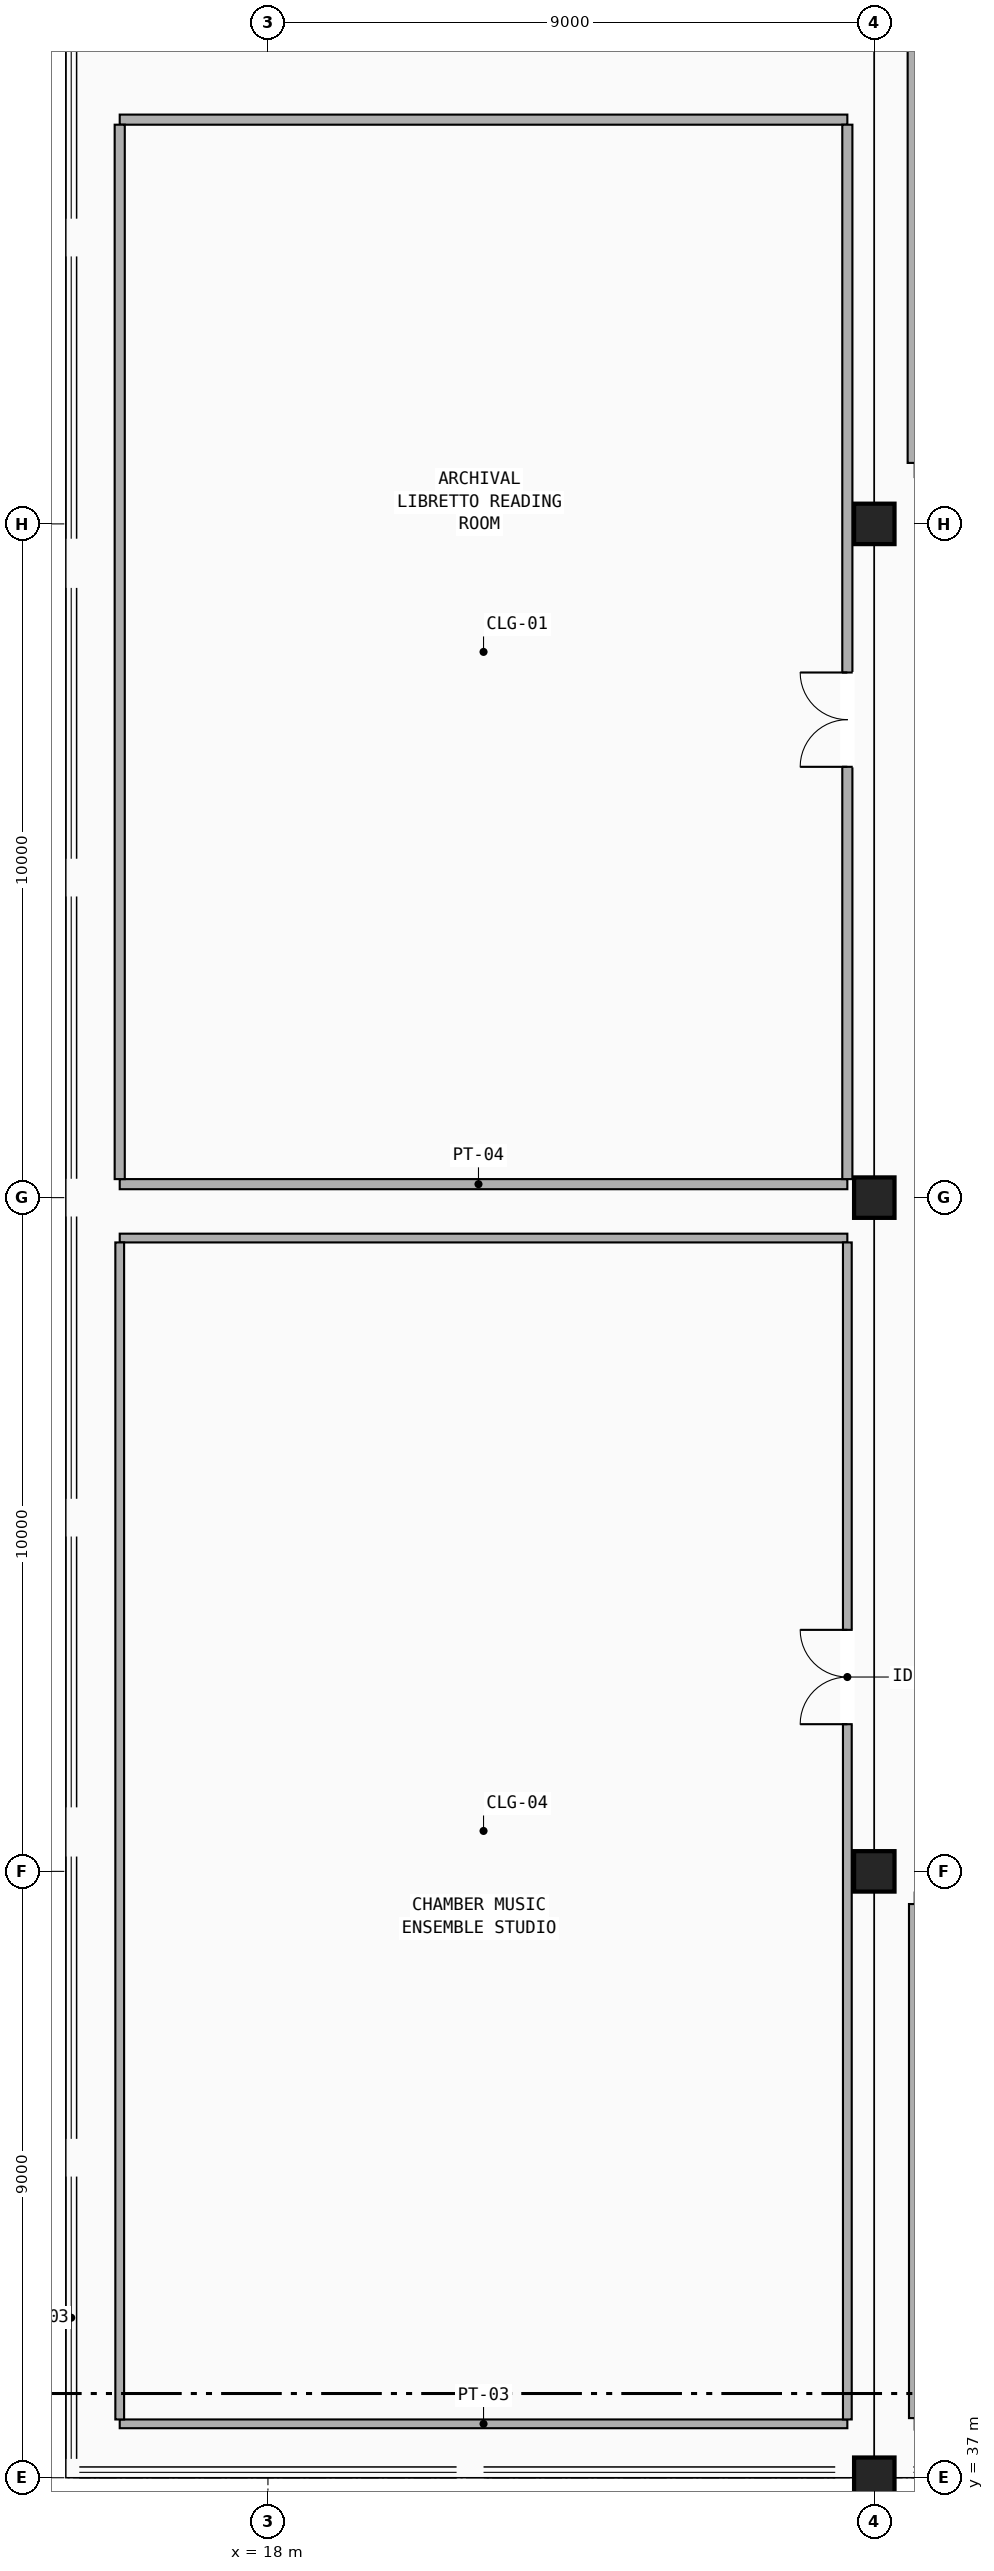
"""IFC4 building model, lengths in metres.
Left out: names, types, materials, properties, quantities, classifications, styles, units other than length and angle.
Written with IfcOpenShell. Run it as: python <this file> out.ifc"""

import sys

from ifc_helpers import new_model, si_unit, direction, frame, frame_2d, origin, origin_2d, place, context, subcontext, project, spatial, rectangle, extrude, element, fill, save


model = new_model("IFC4")
c1 = context("Model", 3, precision=1e-05, world=origin(), true_north=direction((0.0, 1.0)))
c2 = subcontext(c1, "Body", "Model", "MODEL_VIEW")
j1 = project(units=[si_unit("LENGTHUNIT", "METRE"), si_unit("PLANEANGLEUNIT", "RADIAN")], contexts=[c1])
p1 = place(None, origin())
s1 = spatial("IfcSite", under=j1, at=p1, CompositionType="ELEMENT")
p2 = place(p1, origin())
s2 = spatial("IfcBuilding", under=s1, at=p2, CompositionType="ELEMENT")
p3 = place(p2, frame((0.0, 0.0, 21.76)))
s3 = spatial("IfcBuildingStorey", under=s2, at=p3, CompositionType="ELEMENT", Elevation=21.76)
p4 = place(p3, frame((27.0, 37.0, 0.0), z_axis=(0.0, 0.0, 1.0), x_axis=(1.0, 0.0, 0.0)))
e1 = element("IfcColumn", 1, at=p4, inside=s3, PredefinedType="COLUMN", context=c2, shape_type="SweptSolid", body=[
    extrude(rectangle(XDim=0.6, YDim=0.6, at=origin_2d()), origin(), (0.0, 0.0, 1.0), 9.0),
])
p5 = place(p3, frame((27.0, 46.0, 0.0), z_axis=(0.0, 0.0, 1.0), x_axis=(1.0, 0.0, 0.0)))
e2 = element("IfcColumn", 2, at=p5, inside=s3, PredefinedType="COLUMN", context=c2, shape_type="SweptSolid", body=[
    extrude(rectangle(XDim=0.6, YDim=0.6, at=origin_2d()), origin(), (0.0, 0.0, 1.0), 7.987),
])
p6 = place(p3, frame((27.0, 56.0, 0.0), z_axis=(0.0, 0.0, 1.0), x_axis=(1.0, 0.0, 0.0)))
e3 = element("IfcColumn", 3, at=p6, inside=s3, PredefinedType="COLUMN", context=c2, shape_type="SweptSolid", body=[
    extrude(rectangle(XDim=0.6, YDim=0.6, at=origin_2d()), origin(), (0.0, 0.0, 1.0), 3.25),
])
p7 = place(p3, frame((27.0, 66.0, 0.0), z_axis=(0.0, 0.0, 1.0), x_axis=(1.0, 0.0, 0.0)))
e4 = element("IfcColumn", 4, at=p7, inside=s3, PredefinedType="COLUMN", context=c2, shape_type="SweptSolid", body=[
    extrude(rectangle(XDim=0.6, YDim=0.6, at=origin_2d()), origin(), (0.0, 0.0, 1.0), 7.987),
])
for number, where, z_axis, x_axis in (
    (5, (15.8, 37.8, 0.0), (0.0, 0.0, 1.0), (1.0, 0.0, 0.0)),
    (6, (15.8, 55.4, 0.0), (0.0, 0.0, 1.0), (1.0, 0.0, 0.0)),
):
    element("IfcWall", number, at=place(p3, frame(where, z_axis=z_axis, x_axis=x_axis)), inside=s3, PredefinedType="PARTITIONING", context=c2, shape_type="SweptSolid", body=[
        extrude(rectangle(XDim=10.8, YDim=0.13, at=frame_2d((5.4, 0.0))), origin(), (0.0, 0.0, 1.0), 3.594),
    ])
p8 = place(p3, frame((15.8, 37.865, 0.0), z_axis=(0.0, 0.0, 1.0), x_axis=(0.0, 1.0, 0.0)))
e7 = element("IfcWall", 7, at=p8, inside=s3, PredefinedType="PARTITIONING", context=c2, shape_type="SweptSolid", body=[
    extrude(rectangle(XDim=17.47, YDim=0.13, at=frame_2d((8.735, 0.0))), origin(), (0.0, 0.0, 1.0), 3.594),
])
p9 = place(p3, frame((26.6, 37.865, 0.0), z_axis=(0.0, 0.0, 1.0), x_axis=(0.0, 1.0, 0.0)))
e8 = element("IfcWall", 8, at=p9, inside=s3, PredefinedType="PARTITIONING", context=c2, shape_type="SweptSolid", body=[
    extrude(rectangle(XDim=17.47, YDim=0.13, at=frame_2d((8.735, 0.0))), origin(), (0.0, 0.0, 1.0), 3.594),
])
p10 = place(p9, frame((10.32, 0.0, 0.0)))
e9 = element("IfcOpeningElement", 9, at=p10, cuts=e8, PredefinedType="OPENING", context=c2, shape_type="SweptSolid", body=[
    extrude(rectangle(XDim=1.4, YDim=2.2, at=frame_2d((0.7, 1.1))), frame((0.0, 0.075, 0.0), z_axis=(0.0, -1.0, 0.0), x_axis=(1.0, 0.0, 0.0)), (0.0, 0.0, 1.0), 0.15),
])
for number, where, z_axis, x_axis in (
    (10, (15.8, 56.2, 0.0), (0.0, 0.0, 1.0), (1.0, 0.0, 0.0)),
    (11, (15.8, 72.0, 0.0), (0.0, 0.0, 1.0), (1.0, 0.0, 0.0)),
):
    element("IfcWall", number, at=place(p3, frame(where, z_axis=z_axis, x_axis=x_axis)), inside=s3, PredefinedType="PARTITIONING", context=c2, shape_type="SweptSolid", body=[
        extrude(rectangle(XDim=10.8, YDim=0.15, at=frame_2d((5.4, 0.0))), origin(), (0.0, 0.0, 1.0), 3.405),
    ])
p11 = place(p3, frame((15.8, 56.275, 0.0), z_axis=(0.0, 0.0, 1.0), x_axis=(0.0, 1.0, 0.0)))
e12 = element("IfcWall", 12, at=p11, inside=s3, PredefinedType="PARTITIONING", context=c2, shape_type="SweptSolid", body=[
    extrude(rectangle(XDim=15.65, YDim=0.15, at=frame_2d((7.825, 0.0))), origin(), (0.0, 0.0, 1.0), 3.405),
])
p12 = place(p3, frame((26.6, 56.275, 0.0), z_axis=(0.0, 0.0, 1.0), x_axis=(0.0, 1.0, 0.0)))
e13 = element("IfcWall", 13, at=p12, inside=s3, PredefinedType="PARTITIONING", context=c2, shape_type="SweptSolid", body=[
    extrude(rectangle(XDim=15.65, YDim=0.15, at=frame_2d((7.825, 0.0))), origin(), (0.0, 0.0, 1.0), 3.405),
])
p13 = place(p12, frame((6.119, 0.0, 0.0)))
e14 = element("IfcOpeningElement", 14, at=p13, cuts=e13, PredefinedType="OPENING", context=c2, shape_type="SweptSolid", body=[
    extrude(rectangle(XDim=1.4, YDim=2.2, at=frame_2d((0.7, 1.1))), frame((0.0, 0.085, 0.0), z_axis=(0.0, -1.0, 0.0), x_axis=(1.0, 0.0, 0.0)), (0.0, 0.0, 1.0), 0.17),
])
p14 = place(p3, frame((27.6, 37.8, 0.0), z_axis=(0.0, 0.0, 1.0), x_axis=(1.0, 0.0, 0.0)))
e15 = element("IfcWall", 15, at=p14, inside=s3, PredefinedType="PARTITIONING", context=c2, shape_type="SweptSolid", body=[
    extrude(rectangle(XDim=16.6, YDim=0.17, at=frame_2d((8.3, 0.0))), origin(), (0.0, 0.0, 1.0), 2.989),
])
p15 = place(p3, frame((27.6, 45.6, 0.0), z_axis=(0.0, 0.0, 1.0), x_axis=(1.0, 0.0, 0.0)))
e16 = element("IfcWall", 16, at=p15, inside=s3, PredefinedType="PARTITIONING", context=c2, shape_type="SweptSolid", body=[
    extrude(rectangle(XDim=16.6, YDim=0.17, at=frame_2d((8.3, 0.0))), origin(), (0.0, 0.0, 1.0), 2.989),
])
p16 = place(p15, frame((4.424, 0.0, 0.0)))
e17 = element("IfcOpeningElement", 17, at=p16, cuts=e16, PredefinedType="OPENING", context=c2, shape_type="SweptSolid", body=[
    extrude(rectangle(XDim=1.2, YDim=2.2, at=frame_2d((0.6, 1.1))), frame((0.0, 0.095, 0.0), z_axis=(0.0, -1.0, 0.0), x_axis=(1.0, 0.0, 0.0)), (0.0, 0.0, 1.0), 0.19),
])
p17 = place(p3, frame((27.6, 37.885, 0.0), z_axis=(0.0, 0.0, 1.0), x_axis=(0.0, 1.0, 0.0)))
e18 = element("IfcWall", 18, at=p17, inside=s3, PredefinedType="PARTITIONING", context=c2, shape_type="SweptSolid", body=[
    extrude(rectangle(XDim=7.63, YDim=0.17, at=frame_2d((3.815, 0.0))), origin(), (0.0, 0.0, 1.0), 8.236),
])
p18 = place(p3, frame((27.6, 66.8, 0.0), z_axis=(0.0, 0.0, 1.0), x_axis=(1.0, 0.0, 0.0)))
e19 = element("IfcWall", 19, at=p18, inside=s3, PredefinedType="PARTITIONING", context=c2, shape_type="SweptSolid", body=[
    extrude(rectangle(XDim=8.6, YDim=0.21, at=frame_2d((4.3, 0.0))), origin(), (0.0, 0.0, 1.0), 2.989),
])
p19 = place(p18, frame((3.7, 0.0, 0.0)))
e20 = element("IfcOpeningElement", 20, at=p19, cuts=e19, PredefinedType="OPENING", context=c2, shape_type="SweptSolid", body=[
    extrude(rectangle(XDim=1.2, YDim=2.2, at=frame_2d((0.6, 1.1))), frame((0.0, 0.115, 0.0), z_axis=(0.0, -1.0, 0.0), x_axis=(1.0, 0.0, 0.0)), (0.0, 0.0, 1.0), 0.23),
])
p20 = place(p3, frame((27.6, 66.905, 0.0), z_axis=(0.0, 0.0, 1.0), x_axis=(0.0, 1.0, 0.0)))
e21 = element("IfcWall", 21, at=p20, inside=s3, PredefinedType="PARTITIONING", context=c2, shape_type="SweptSolid", body=[
    extrude(rectangle(XDim=7.19, YDim=0.21, at=frame_2d((3.595, 0.0))), origin(), (0.0, 0.0, 1.0), 8.426),
])
p21 = place(p10, origin())
e22 = element("IfcDoor", 22, at=p21, inside=s3, OperationType="DOUBLE_DOOR_SINGLE_SWING", PredefinedType="DOOR", context=c2, shape_type="SweptSolid", body=[
    extrude(rectangle(XDim=1.4, YDim=2.2, at=frame_2d((0.7, 1.1))), frame((0.0, 0.025, 0.0), z_axis=(0.0, -1.0, 0.0), x_axis=(1.0, 0.0, 0.0)), (0.0, 0.0, 1.0), 0.05),
])
fill(e9, e22)
p22 = place(p13, origin())
e23 = element("IfcDoor", 23, at=p22, inside=s3, OperationType="DOUBLE_DOOR_SINGLE_SWING", PredefinedType="DOOR", context=c2, shape_type="SweptSolid", body=[
    extrude(rectangle(XDim=1.4, YDim=2.2, at=frame_2d((0.7, 1.1))), frame((0.0, 0.025, 0.0), z_axis=(0.0, -1.0, 0.0), x_axis=(1.0, 0.0, 0.0)), (0.0, 0.0, 1.0), 0.05),
])
fill(e14, e23)
save(model, sys.argv[1])
